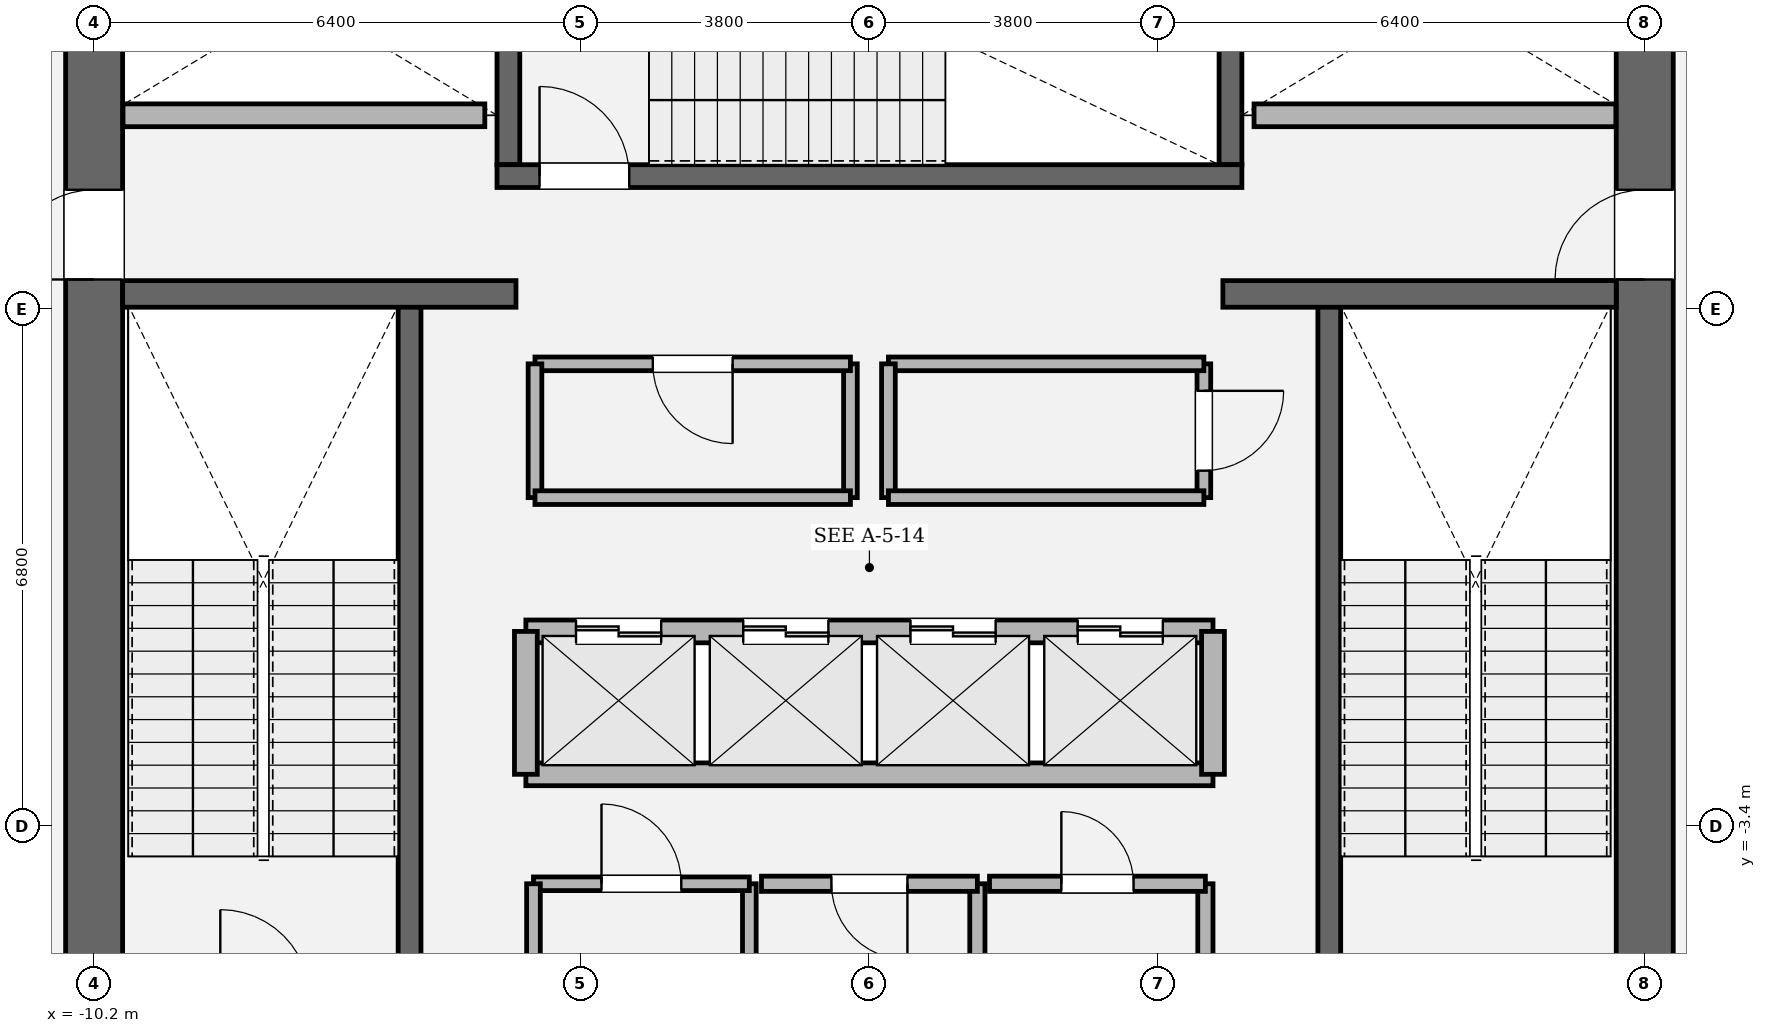
"""IFC4 building model, lengths in metres.
Left out: names, types, materials, properties, quantities, classifications, styles, units other than length and angle.
Written with IfcOpenShell. Run it as: python <this file> out.ifc"""

import sys

from ifc_helpers import new_model, si_unit, direction, frame, frame_2d, origin, place, context, subcontext, project, spatial, rectangle, extrude, element, fill, save


model = new_model("IFC4")
c1 = context("Model", 3, precision=1e-05, world=origin(), true_north=direction((0.0, 1.0)))
c2 = subcontext(c1, "Body", "Model", "MODEL_VIEW")
j1 = project(units=[si_unit("LENGTHUNIT", "METRE"), si_unit("PLANEANGLEUNIT", "RADIAN")], contexts=[c1])
p1 = place(None, origin())
s1 = spatial("IfcSite", under=j1, at=p1, CompositionType="ELEMENT")
p2 = place(p1, origin())
s2 = spatial("IfcBuilding", under=s1, at=p2, CompositionType="ELEMENT")
p3 = place(p2, frame((0.0, 0.0, 60.6)))
s3 = spatial("IfcBuildingStorey", under=s2, at=p3, CompositionType="ELEMENT", Elevation=60.6)
p4 = place(p3, frame((-10.2, -8.825, 0.0), z_axis=(0.0, 0.0, 1.0), x_axis=(0.0, 1.0, 0.0)))
e1 = element("IfcWall", 1, at=p4, inside=s3, PredefinedType="SHEAR", context=c2, shape_type="SweptSolid", body=[
    extrude(rectangle(XDim=17.65, YDim=0.75, at=frame_2d((8.825, 0.0))), origin(), (0.0, 0.0, 1.0), 4.05),
])
p5 = place(p4, frame((12.615, 0.0, 0.0)))
e2 = element("IfcOpeningElement", 2, at=p5, cuts=e1, PredefinedType="OPENING", context=c2, shape_type="SweptSolid", body=[
    extrude(rectangle(XDim=1.18, YDim=2.2, at=frame_2d((0.59, 1.1))), frame((0.0, 0.385, 0.0), z_axis=(0.0, -1.0, 0.0), x_axis=(1.0, 0.0, 0.0)), (0.0, 0.0, 1.0), 0.77),
])
p6 = place(p3, frame((10.2, 8.825, 0.0), z_axis=(0.0, 0.0, 1.0), x_axis=(0.0, -1.0, 0.0)))
e3 = element("IfcWall", 3, at=p6, inside=s3, PredefinedType="SHEAR", context=c2, shape_type="SweptSolid", body=[
    extrude(rectangle(XDim=17.65, YDim=0.75, at=frame_2d((8.825, 0.0))), origin(), (0.0, 0.0, 1.0), 4.05),
])
p7 = place(p6, frame((3.855, 0.0, 0.0)))
e4 = element("IfcOpeningElement", 4, at=p7, cuts=e3, PredefinedType="OPENING", context=c2, shape_type="SweptSolid", body=[
    extrude(rectangle(XDim=1.18, YDim=2.2, at=frame_2d((0.59, 1.1))), frame((0.0, 0.385, 0.0), z_axis=(0.0, -1.0, 0.0), x_axis=(1.0, 0.0, 0.0)), (0.0, 0.0, 1.0), 0.77),
])
for number, where, z_axis, x_axis in (
    (5, (-6.05, -5.5, 0.0), (0.0, 0.0, 1.0), (0.0, 1.0, 0.0)),
    (6, (6.05, 3.45, 0.0), (0.0, 0.0, 1.0), (0.0, -1.0, 0.0)),
):
    element("IfcWall", number, at=place(p3, frame(where, z_axis=z_axis, x_axis=x_axis)), inside=s3, PredefinedType="SOLIDWALL", context=c2, shape_type="SweptSolid", body=[
        extrude(rectangle(XDim=8.95, YDim=0.3, at=frame_2d((4.475, 0.0))), origin(), (0.0, 0.0, 1.0), 4.05),
    ])
for number, where, z_axis, x_axis in (
    (7, (-4.75, 5.3, 0.0), (0.0, 0.0, 1.0), (0.0, 1.0, 0.0)),
    (8, (4.75, 8.825, 0.0), (0.0, 0.0, 1.0), (0.0, -1.0, 0.0)),
):
    element("IfcWall", number, at=place(p3, frame(where, z_axis=z_axis, x_axis=x_axis)), inside=s3, PredefinedType="SOLIDWALL", context=c2, shape_type="SweptSolid", body=[
        extrude(rectangle(XDim=3.525, YDim=0.3, at=frame_2d((1.762, 0.0))), origin(), (0.0, 0.0, 1.0), 4.05),
    ])
p8 = place(p3, frame((-4.9, 5.15, 0.0), z_axis=(0.0, 0.0, 1.0), x_axis=(1.0, 0.0, 0.0)))
e9 = element("IfcWall", 9, at=p8, inside=s3, PredefinedType="SOLIDWALL", context=c2, shape_type="SweptSolid", body=[
    extrude(rectangle(XDim=9.8, YDim=0.3, at=frame_2d((4.9, 0.0))), origin(), (0.0, 0.0, 1.0), 4.05),
])
p9 = place(p8, frame((0.56, 0.0, 0.0)))
e10 = element("IfcOpeningElement", 10, at=p9, cuts=e9, PredefinedType="OPENING", context=c2, shape_type="SweptSolid", body=[
    extrude(rectangle(XDim=1.18, YDim=2.2, at=frame_2d((0.59, 1.1))), frame((0.0, 0.16, 0.0), z_axis=(0.0, -1.0, 0.0), x_axis=(1.0, 0.0, 0.0)), (0.0, 0.0, 1.0), 0.32),
])
for number, where, z_axis, x_axis in (
    (11, (-9.825, 3.6, 0.0), (0.0, 0.0, 1.0), (1.0, 0.0, 0.0)),
    (12, (4.65, 3.6, 0.0), (0.0, 0.0, 1.0), (1.0, 0.0, 0.0)),
):
    element("IfcWall", number, at=place(p3, frame(where, z_axis=z_axis, x_axis=x_axis)), inside=s3, PredefinedType="SOLIDWALL", context=c2, shape_type="SweptSolid", body=[
        extrude(rectangle(XDim=5.175, YDim=0.35, at=frame_2d((2.587, 0.0))), origin(), (0.0, 0.0, 1.0), 4.05),
    ])
p10 = place(p3, frame((-4.52, -0.84, 0.0), z_axis=(0.0, 0.0, 1.0), x_axis=(1.0, 0.0, 0.0)))
e13 = element("IfcWall", 13, at=p10, inside=s3, PredefinedType="SOLIDWALL", context=c2, shape_type="SweptSolid", body=[
    extrude(rectangle(XDim=9.04, YDim=0.3, at=frame_2d((4.52, 0.0))), origin(), (0.0, 0.0, 1.0), 3.81),
])
p11 = place(p10, frame((0.66, 0.0, 0.0)))
e14 = element("IfcOpeningElement", 14, at=p11, cuts=e13, PredefinedType="OPENING", context=c2, shape_type="SweptSolid", body=[
    extrude(rectangle(XDim=1.12, YDim=2.25, at=frame_2d((0.56, 1.125))), frame((0.0, 0.16, 0.0), z_axis=(0.0, -1.0, 0.0), x_axis=(1.0, 0.0, 0.0)), (0.0, 0.0, 1.0), 0.32),
])
p12 = place(p10, frame((2.86, 0.0, 0.0)))
e15 = element("IfcOpeningElement", 15, at=p12, cuts=e13, PredefinedType="OPENING", context=c2, shape_type="SweptSolid", body=[
    extrude(rectangle(XDim=1.12, YDim=2.25, at=frame_2d((0.56, 1.125))), frame((0.0, 0.16, 0.0), z_axis=(0.0, -1.0, 0.0), x_axis=(1.0, 0.0, 0.0)), (0.0, 0.0, 1.0), 0.32),
])
p13 = place(p10, frame((5.06, 0.0, 0.0)))
e16 = element("IfcOpeningElement", 16, at=p13, cuts=e13, PredefinedType="OPENING", context=c2, shape_type="SweptSolid", body=[
    extrude(rectangle(XDim=1.12, YDim=2.25, at=frame_2d((0.56, 1.125))), frame((0.0, 0.16, 0.0), z_axis=(0.0, -1.0, 0.0), x_axis=(1.0, 0.0, 0.0)), (0.0, 0.0, 1.0), 0.32),
])
p14 = place(p10, frame((7.26, 0.0, 0.0)))
e17 = element("IfcOpeningElement", 17, at=p14, cuts=e13, PredefinedType="OPENING", context=c2, shape_type="SweptSolid", body=[
    extrude(rectangle(XDim=1.12, YDim=2.25, at=frame_2d((0.56, 1.125))), frame((0.0, 0.16, 0.0), z_axis=(0.0, -1.0, 0.0), x_axis=(1.0, 0.0, 0.0)), (0.0, 0.0, 1.0), 0.32),
])
p15 = place(p3, frame((-4.52, -2.72, 0.0), z_axis=(0.0, 0.0, 1.0), x_axis=(1.0, 0.0, 0.0)))
e18 = element("IfcWall", 18, at=p15, inside=s3, PredefinedType="SOLIDWALL", context=c2, shape_type="SweptSolid", body=[
    extrude(rectangle(XDim=9.04, YDim=0.3, at=frame_2d((4.52, 0.0))), origin(), (0.0, 0.0, 1.0), 3.81),
])
for number, where, z_axis, x_axis in (
    (19, (-4.52, -2.72, 0.0), (0.0, 0.0, 1.0), (0.0, 1.0, 0.0)),
    (20, (4.52, -2.72, 0.0), (0.0, 0.0, 1.0), (0.0, 1.0, 0.0)),
):
    element("IfcWall", number, at=place(p3, frame(where, z_axis=z_axis, x_axis=x_axis)), inside=s3, PredefinedType="SOLIDWALL", context=c2, shape_type="SweptSolid", body=[
        extrude(rectangle(XDim=1.88, YDim=0.3, at=frame_2d((0.94, 0.0))), origin(), (0.0, 0.0, 1.0), 3.81),
    ])
for number, where, z_axis, x_axis in (
    (21, (-9.82, 5.95, 0.0), (0.0, 0.0, 1.0), (1.0, 0.0, 0.0)),
    (22, (5.06, 5.95, 0.0), (0.0, 0.0, 1.0), (1.0, 0.0, 0.0)),
):
    element("IfcWall", number, at=place(p3, frame(where, z_axis=z_axis, x_axis=x_axis)), inside=s3, PredefinedType="SOLIDWALL", context=c2, shape_type="SweptSolid", body=[
        extrude(rectangle(XDim=4.76, YDim=0.3, at=frame_2d((2.38, 0.0))), origin(), (0.0, 0.0, 1.0), 3.81),
    ])
p16 = place(p3, frame((-1.58, -5.9, 0.0), z_axis=(0.0, 0.0, 1.0), x_axis=(0.0, 1.0, 0.0)))
e23 = element("IfcWall", 23, at=p16, inside=s3, PredefinedType="PARTITIONING", context=c2, shape_type="SweptSolid", body=[
    extrude(rectangle(XDim=1.74, YDim=0.18, at=frame_2d((0.87, 0.0))), origin(), (0.0, 0.0, 1.0), 3.81),
])
p17 = place(p3, frame((-1.58, -4.16, 0.0), z_axis=(0.0, 0.0, 1.0), x_axis=(-1.0, 0.0, 0.0)))
e24 = element("IfcWall", 24, at=p17, inside=s3, PredefinedType="PARTITIONING", context=c2, shape_type="SweptSolid", body=[
    extrude(rectangle(XDim=2.84, YDim=0.18, at=frame_2d((1.42, 0.0))), origin(), (0.0, 0.0, 1.0), 3.81),
])
p18 = place(p17, frame((0.895, 0.0, 0.0)))
e25 = element("IfcOpeningElement", 25, at=p18, cuts=e24, PredefinedType="OPENING", context=c2, shape_type="SweptSolid", body=[
    extrude(rectangle(XDim=1.05, YDim=2.2, at=frame_2d((0.525, 1.1))), frame((0.0, 0.1, 0.0), z_axis=(0.0, -1.0, 0.0), x_axis=(1.0, 0.0, 0.0)), (0.0, 0.0, 1.0), 0.2),
])
p19 = place(p3, frame((-4.42, -4.16, 0.0), z_axis=(0.0, 0.0, 1.0), x_axis=(0.0, -1.0, 0.0)))
e26 = element("IfcWall", 26, at=p19, inside=s3, PredefinedType="PARTITIONING", context=c2, shape_type="SweptSolid", body=[
    extrude(rectangle(XDim=1.74, YDim=0.18, at=frame_2d((0.87, 0.0))), origin(), (0.0, 0.0, 1.0), 3.81),
])
p20 = place(p3, frame((1.42, -5.9, 0.0), z_axis=(0.0, 0.0, 1.0), x_axis=(0.0, 1.0, 0.0)))
e27 = element("IfcWall", 27, at=p20, inside=s3, PredefinedType="SOLIDWALL", context=c2, shape_type="SweptSolid", body=[
    extrude(rectangle(XDim=1.74, YDim=0.2, at=frame_2d((0.87, 0.0))), origin(), (0.0, 0.0, 1.0), 3.81),
])
p21 = place(p3, frame((1.42, -4.16, 0.0), z_axis=(0.0, 0.0, 1.0), x_axis=(-1.0, 0.0, 0.0)))
e28 = element("IfcWall", 28, at=p21, inside=s3, PredefinedType="SOLIDWALL", context=c2, shape_type="SweptSolid", body=[
    extrude(rectangle(XDim=2.84, YDim=0.2, at=frame_2d((1.42, 0.0))), origin(), (0.0, 0.0, 1.0), 3.81),
])
p22 = place(p21, frame((0.92, 0.0, 0.0)))
e29 = element("IfcOpeningElement", 29, at=p22, cuts=e28, PredefinedType="OPENING", context=c2, shape_type="SweptSolid", body=[
    extrude(rectangle(XDim=1.0, YDim=2.15, at=frame_2d((0.5, 1.075))), frame((0.0, 0.11, 0.0), z_axis=(0.0, -1.0, 0.0), x_axis=(1.0, 0.0, 0.0)), (0.0, 0.0, 1.0), 0.22),
])
p23 = place(p3, frame((4.42, -5.9, 0.0), z_axis=(0.0, 0.0, 1.0), x_axis=(0.0, 1.0, 0.0)))
e30 = element("IfcWall", 30, at=p23, inside=s3, PredefinedType="SOLIDWALL", context=c2, shape_type="SweptSolid", body=[
    extrude(rectangle(XDim=1.74, YDim=0.2, at=frame_2d((0.87, 0.0))), origin(), (0.0, 0.0, 1.0), 3.81),
])
p24 = place(p3, frame((4.42, -4.16, 0.0), z_axis=(0.0, 0.0, 1.0), x_axis=(-1.0, 0.0, 0.0)))
e31 = element("IfcWall", 31, at=p24, inside=s3, PredefinedType="SOLIDWALL", context=c2, shape_type="SweptSolid", body=[
    extrude(rectangle(XDim=2.84, YDim=0.2, at=frame_2d((1.42, 0.0))), origin(), (0.0, 0.0, 1.0), 3.81),
])
p25 = place(p24, frame((0.945, 0.0, 0.0)))
e32 = element("IfcOpeningElement", 32, at=p25, cuts=e31, PredefinedType="OPENING", context=c2, shape_type="SweptSolid", body=[
    extrude(rectangle(XDim=0.95, YDim=2.15, at=frame_2d((0.475, 1.075))), frame((0.0, 0.11, 0.0), z_axis=(0.0, -1.0, 0.0), x_axis=(1.0, 0.0, 0.0)), (0.0, 0.0, 1.0), 0.22),
])
p26 = place(p3, frame((-0.25, 0.92, 0.0), z_axis=(0.0, 0.0, 1.0), x_axis=(0.0, 1.0, 0.0)))
e33 = element("IfcWall", 33, at=p26, inside=s3, PredefinedType="PARTITIONING", context=c2, shape_type="SweptSolid", body=[
    extrude(rectangle(XDim=1.76, YDim=0.18, at=frame_2d((0.88, 0.0))), origin(), (0.0, 0.0, 1.0), 3.81),
])
p27 = place(p3, frame((-0.25, 2.68, 0.0), z_axis=(0.0, 0.0, 1.0), x_axis=(-1.0, 0.0, 0.0)))
e34 = element("IfcWall", 34, at=p27, inside=s3, PredefinedType="PARTITIONING", context=c2, shape_type="SweptSolid", body=[
    extrude(rectangle(XDim=4.15, YDim=0.18, at=frame_2d((2.075, 0.0))), origin(), (0.0, 0.0, 1.0), 3.81),
])
p28 = place(p27, frame((1.55, 0.0, 0.0)))
e35 = element("IfcOpeningElement", 35, at=p28, cuts=e34, PredefinedType="OPENING", context=c2, shape_type="SweptSolid", body=[
    extrude(rectangle(XDim=1.05, YDim=2.2, at=frame_2d((0.525, 1.1))), frame((0.0, 0.1, 0.0), z_axis=(0.0, -1.0, 0.0), x_axis=(1.0, 0.0, 0.0)), (0.0, 0.0, 1.0), 0.2),
])
p29 = place(p3, frame((-4.4, 2.68, 0.0), z_axis=(0.0, 0.0, 1.0), x_axis=(0.0, -1.0, 0.0)))
e36 = element("IfcWall", 36, at=p29, inside=s3, PredefinedType="PARTITIONING", context=c2, shape_type="SweptSolid", body=[
    extrude(rectangle(XDim=1.76, YDim=0.18, at=frame_2d((0.88, 0.0))), origin(), (0.0, 0.0, 1.0), 3.81),
])
p30 = place(p3, frame((-4.4, 0.92, 0.0), z_axis=(0.0, 0.0, 1.0), x_axis=(1.0, 0.0, 0.0)))
e37 = element("IfcWall", 37, at=p30, inside=s3, PredefinedType="PARTITIONING", context=c2, shape_type="SweptSolid", body=[
    extrude(rectangle(XDim=4.15, YDim=0.18, at=frame_2d((2.075, 0.0))), origin(), (0.0, 0.0, 1.0), 3.81),
])
p31 = place(p3, frame((4.4, 0.92, 0.0), z_axis=(0.0, 0.0, 1.0), x_axis=(0.0, 1.0, 0.0)))
e38 = element("IfcWall", 38, at=p31, inside=s3, PredefinedType="PARTITIONING", context=c2, shape_type="SweptSolid", body=[
    extrude(rectangle(XDim=1.76, YDim=0.18, at=frame_2d((0.88, 0.0))), origin(), (0.0, 0.0, 1.0), 3.81),
])
p32 = place(p31, frame((0.355, 0.0, 0.0)))
e39 = element("IfcOpeningElement", 39, at=p32, cuts=e38, PredefinedType="OPENING", context=c2, shape_type="SweptSolid", body=[
    extrude(rectangle(XDim=1.05, YDim=2.2, at=frame_2d((0.525, 1.1))), frame((0.0, 0.1, 0.0), z_axis=(0.0, -1.0, 0.0), x_axis=(1.0, 0.0, 0.0)), (0.0, 0.0, 1.0), 0.2),
])
p33 = place(p3, frame((4.4, 2.68, 0.0), z_axis=(0.0, 0.0, 1.0), x_axis=(-1.0, 0.0, 0.0)))
e40 = element("IfcWall", 40, at=p33, inside=s3, PredefinedType="PARTITIONING", context=c2, shape_type="SweptSolid", body=[
    extrude(rectangle(XDim=4.15, YDim=0.18, at=frame_2d((2.075, 0.0))), origin(), (0.0, 0.0, 1.0), 3.81),
])
p34 = place(p3, frame((0.25, 2.68, 0.0), z_axis=(0.0, 0.0, 1.0), x_axis=(0.0, -1.0, 0.0)))
e41 = element("IfcWall", 41, at=p34, inside=s3, PredefinedType="PARTITIONING", context=c2, shape_type="SweptSolid", body=[
    extrude(rectangle(XDim=1.76, YDim=0.18, at=frame_2d((0.88, 0.0))), origin(), (0.0, 0.0, 1.0), 3.81),
])
p35 = place(p3, frame((0.25, 0.92, 0.0), z_axis=(0.0, 0.0, 1.0), x_axis=(1.0, 0.0, 0.0)))
e42 = element("IfcWall", 42, at=p35, inside=s3, PredefinedType="PARTITIONING", context=c2, shape_type="SweptSolid", body=[
    extrude(rectangle(XDim=4.15, YDim=0.18, at=frame_2d((2.075, 0.0))), origin(), (0.0, 0.0, 1.0), 3.81),
])
p36 = place(p9, origin())
e43 = element("IfcDoor", 43, at=p36, inside=s3, OperationType="SINGLE_SWING_LEFT", PredefinedType="DOOR", context=c2, shape_type="SweptSolid", body=[
    extrude(rectangle(XDim=1.18, YDim=2.2, at=frame_2d((0.59, 1.1))), frame((0.0, 0.025, 0.0), z_axis=(0.0, -1.0, 0.0), x_axis=(1.0, 0.0, 0.0)), (0.0, 0.0, 1.0), 0.05),
])
fill(e10, e43)
p37 = place(p5, origin())
e44 = element("IfcDoor", 44, at=p37, inside=s3, OperationType="SINGLE_SWING_LEFT", PredefinedType="DOOR", context=c2, shape_type="SweptSolid", body=[
    extrude(rectangle(XDim=1.18, YDim=2.2, at=frame_2d((0.59, 1.1))), frame((0.0, 0.025, 0.0), z_axis=(0.0, -1.0, 0.0), x_axis=(1.0, 0.0, 0.0)), (0.0, 0.0, 1.0), 0.05),
])
fill(e2, e44)
p38 = place(p7, origin())
e45 = element("IfcDoor", 45, at=p38, inside=s3, OperationType="SINGLE_SWING_RIGHT", PredefinedType="DOOR", context=c2, shape_type="SweptSolid", body=[
    extrude(rectangle(XDim=1.18, YDim=2.2, at=frame_2d((0.59, 1.1))), frame((0.0, 0.025, 0.0), z_axis=(0.0, -1.0, 0.0), x_axis=(1.0, 0.0, 0.0)), (0.0, 0.0, 1.0), 0.05),
])
fill(e4, e45)
p39 = place(p11, origin())
e46 = element("IfcDoor", 46, at=p39, inside=s3, OperationType="DOUBLE_DOOR_SLIDING", PredefinedType="DOOR", context=c2, shape_type="SweptSolid", body=[
    extrude(rectangle(XDim=1.12, YDim=2.25, at=frame_2d((0.56, 1.125))), frame((0.0, 0.025, 0.0), z_axis=(0.0, -1.0, 0.0), x_axis=(1.0, 0.0, 0.0)), (0.0, 0.0, 1.0), 0.05),
])
fill(e14, e46)
p40 = place(p12, origin())
e47 = element("IfcDoor", 47, at=p40, inside=s3, OperationType="DOUBLE_DOOR_SLIDING", PredefinedType="DOOR", context=c2, shape_type="SweptSolid", body=[
    extrude(rectangle(XDim=1.12, YDim=2.25, at=frame_2d((0.56, 1.125))), frame((0.0, 0.025, 0.0), z_axis=(0.0, -1.0, 0.0), x_axis=(1.0, 0.0, 0.0)), (0.0, 0.0, 1.0), 0.05),
])
fill(e15, e47)
p41 = place(p13, origin())
e48 = element("IfcDoor", 48, at=p41, inside=s3, OperationType="DOUBLE_DOOR_SLIDING", PredefinedType="DOOR", context=c2, shape_type="SweptSolid", body=[
    extrude(rectangle(XDim=1.12, YDim=2.25, at=frame_2d((0.56, 1.125))), frame((0.0, 0.025, 0.0), z_axis=(0.0, -1.0, 0.0), x_axis=(1.0, 0.0, 0.0)), (0.0, 0.0, 1.0), 0.05),
])
fill(e16, e48)
p42 = place(p14, origin())
e49 = element("IfcDoor", 49, at=p42, inside=s3, OperationType="DOUBLE_DOOR_SLIDING", PredefinedType="DOOR", context=c2, shape_type="SweptSolid", body=[
    extrude(rectangle(XDim=1.12, YDim=2.25, at=frame_2d((0.56, 1.125))), frame((0.0, 0.025, 0.0), z_axis=(0.0, -1.0, 0.0), x_axis=(1.0, 0.0, 0.0)), (0.0, 0.0, 1.0), 0.05),
])
fill(e17, e49)
p43 = place(p18, origin())
e50 = element("IfcDoor", 50, at=p43, inside=s3, OperationType="SINGLE_SWING_RIGHT", PredefinedType="DOOR", context=c2, shape_type="SweptSolid", body=[
    extrude(rectangle(XDim=1.05, YDim=2.2, at=frame_2d((0.525, 1.1))), frame((0.0, 0.025, 0.0), z_axis=(0.0, -1.0, 0.0), x_axis=(1.0, 0.0, 0.0)), (0.0, 0.0, 1.0), 0.05),
])
fill(e25, e50)
p44 = place(p22, origin())
e51 = element("IfcDoor", 51, at=p44, inside=s3, OperationType="SINGLE_SWING_LEFT", PredefinedType="DOOR", context=c2, shape_type="SweptSolid", body=[
    extrude(rectangle(XDim=1.0, YDim=2.15, at=frame_2d((0.5, 1.075))), frame((0.0, 0.025, 0.0), z_axis=(0.0, -1.0, 0.0), x_axis=(1.0, 0.0, 0.0)), (0.0, 0.0, 1.0), 0.05),
])
fill(e29, e51)
p45 = place(p25, origin())
e52 = element("IfcDoor", 52, at=p45, inside=s3, OperationType="SINGLE_SWING_RIGHT", PredefinedType="DOOR", context=c2, shape_type="SweptSolid", body=[
    extrude(rectangle(XDim=0.95, YDim=2.15, at=frame_2d((0.475, 1.075))), frame((0.0, 0.025, 0.0), z_axis=(0.0, -1.0, 0.0), x_axis=(1.0, 0.0, 0.0)), (0.0, 0.0, 1.0), 0.05),
])
fill(e32, e52)
p46 = place(p28, origin())
e53 = element("IfcDoor", 53, at=p46, inside=s3, OperationType="SINGLE_SWING_LEFT", PredefinedType="DOOR", context=c2, shape_type="SweptSolid", body=[
    extrude(rectangle(XDim=1.05, YDim=2.2, at=frame_2d((0.525, 1.1))), frame((0.0, 0.025, 0.0), z_axis=(0.0, -1.0, 0.0), x_axis=(1.0, 0.0, 0.0)), (0.0, 0.0, 1.0), 0.05),
])
fill(e35, e53)
p47 = place(p32, origin())
e54 = element("IfcDoor", 54, at=p47, inside=s3, OperationType="SINGLE_SWING_RIGHT", PredefinedType="DOOR", context=c2, shape_type="SweptSolid", body=[
    extrude(rectangle(XDim=1.05, YDim=2.2, at=frame_2d((0.525, 1.1))), frame((0.0, 0.025, 0.0), z_axis=(0.0, -1.0, 0.0), x_axis=(1.0, 0.0, 0.0)), (0.0, 0.0, 1.0), 0.05),
])
fill(e39, e54)
save(model, sys.argv[1])
